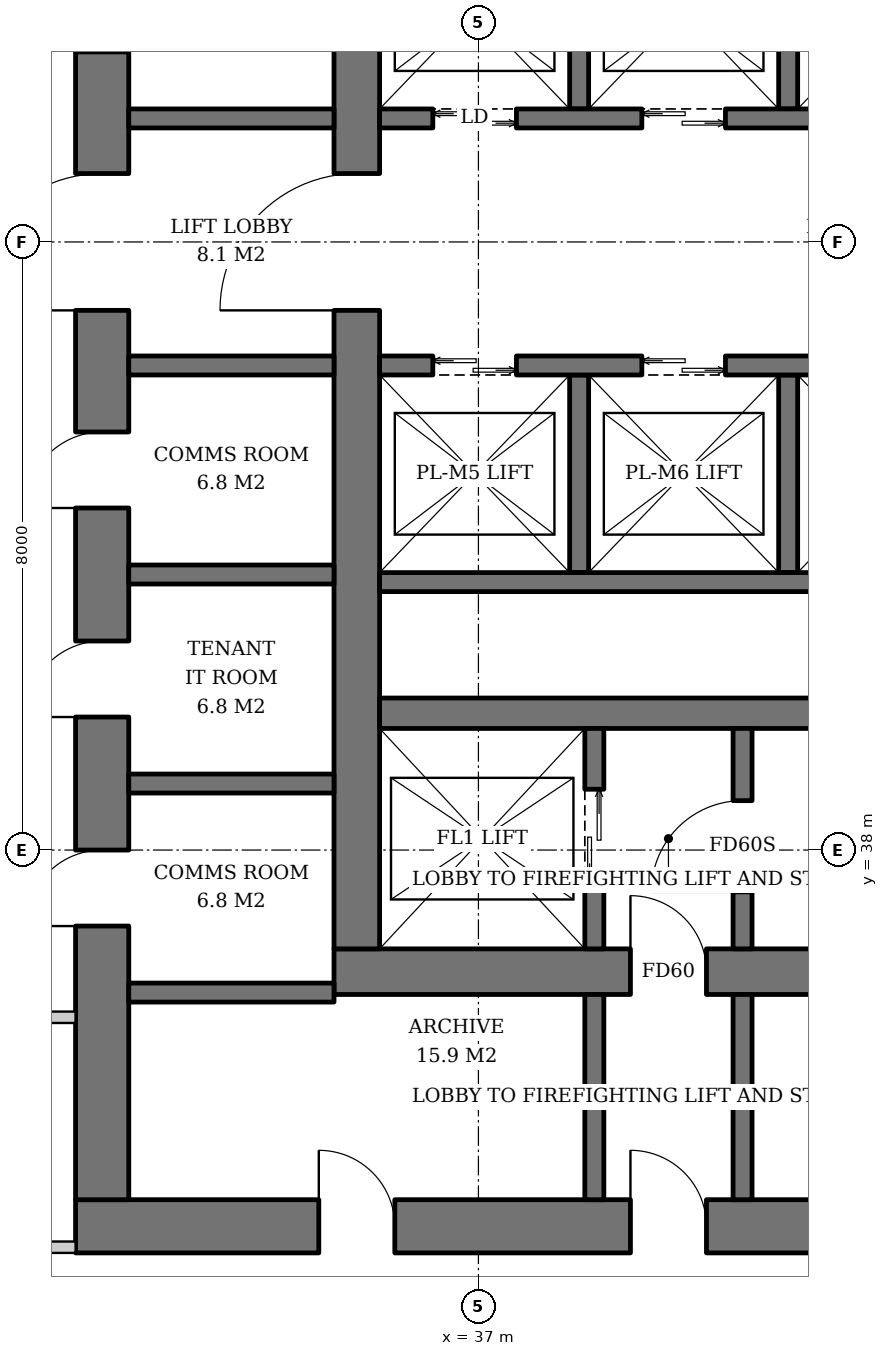
"""IFC4 building model, lengths in metres.
Left out: names, types, materials, properties, quantities, classifications, styles, units other than length and angle.
Written with IfcOpenShell. Run it as: python <this file> out.ifc"""

import sys

from ifc_helpers import new_model, si_unit, direction, frame, frame_2d, origin, place, context, subcontext, project, spatial, rectangle, extrude, element, fill, save


model = new_model("IFC4")
c1 = context("Model", 3, precision=1e-05, world=origin(), true_north=direction((0.0, 1.0)))
c2 = subcontext(c1, "Body", "Model", "MODEL_VIEW")
j1 = project(units=[si_unit("LENGTHUNIT", "METRE"), si_unit("PLANEANGLEUNIT", "RADIAN")], contexts=[c1])
p1 = place(None, origin())
s1 = spatial("IfcSite", under=j1, at=p1, CompositionType="ELEMENT")
p2 = place(p1, origin())
s2 = spatial("IfcBuilding", under=s1, at=p2, CompositionType="ELEMENT")
p3 = place(p2, frame((0.0, 0.0, 116.0)))
s3 = spatial("IfcBuildingStorey", under=s2, at=p3, CompositionType="ELEMENT", Elevation=116.0)
p4 = place(p3, frame((35.1, 36.4, 0.0), z_axis=(0.0, 0.0, 1.0), x_axis=(1.0, 0.0, 0.0)))
e1 = element("IfcWall", 1, at=p4, inside=s3, PredefinedType="SHEAR", context=c2, shape_type="SweptSolid", body=[
    extrude(rectangle(XDim=19.8, YDim=0.6, at=frame_2d((9.9, 0.0))), origin(), (0.0, 0.0, 1.0), 3.8),
])
p5 = place(p4, frame((3.9, 0.0, 0.0)))
e2 = element("IfcOpeningElement", 2, at=p5, cuts=e1, PredefinedType="OPENING", context=c2, shape_type="SweptSolid", body=[
    extrude(rectangle(XDim=1.0, YDim=2.1, at=frame_2d((0.5, 1.05))), frame((0.0, 0.31, 0.0), z_axis=(0.0, -1.0, 0.0), x_axis=(1.0, 0.0, 0.0)), (0.0, 0.0, 1.0), 0.62),
])
p6 = place(p4, frame((15.35, 0.0, 0.0)))
e3 = element("IfcOpeningElement", 3, at=p6, cuts=e1, PredefinedType="OPENING", context=c2, shape_type="SweptSolid", body=[
    extrude(rectangle(XDim=1.0, YDim=2.1, at=frame_2d((0.5, 1.05))), frame((0.0, 0.31, 0.0), z_axis=(0.0, -1.0, 0.0), x_axis=(1.0, 0.0, 0.0)), (0.0, 0.0, 1.0), 0.62),
])
p7 = place(p3, frame((35.4, 36.7, 0.0), z_axis=(0.0, 0.0, 1.0), x_axis=(0.0, 1.0, 0.0)))
e4 = element("IfcWall", 4, at=p7, inside=s3, PredefinedType="SHEAR", context=c2, shape_type="SweptSolid", body=[
    extrude(rectangle(XDim=18.6, YDim=0.6, at=frame_2d((9.3, 0.0))), origin(), (0.0, 0.0, 1.0), 3.8),
])
p8 = place(p7, frame((8.4, 0.0, 0.0)))
e5 = element("IfcOpeningElement", 5, at=p8, cuts=e4, PredefinedType="OPENING", context=c2, shape_type="SweptSolid", body=[
    extrude(rectangle(XDim=1.8, YDim=2.4, at=frame_2d((0.9, 1.2))), frame((0.0, 0.31, 0.0), z_axis=(0.0, -1.0, 0.0), x_axis=(1.0, 0.0, 0.0)), (0.0, 0.0, 1.0), 0.62),
])
p9 = place(p3, frame((31.7, 33.05, 0.0), z_axis=(0.0, 0.0, 1.0), x_axis=(1.0, 0.0, 0.0)))
e6 = element("IfcWall", 6, at=p9, inside=s3, PredefinedType="SHEAR", context=c2, shape_type="SweptSolid", body=[
    extrude(rectangle(XDim=26.6, YDim=0.7, at=frame_2d((13.3, 0.0))), origin(), (0.0, 0.0, 1.0), 3.8),
])
p10 = place(p9, frame((7.3, 0.0, 0.0)))
e7 = element("IfcOpeningElement", 7, at=p10, cuts=e6, PredefinedType="OPENING", context=c2, shape_type="SweptSolid", body=[
    extrude(rectangle(XDim=1.0, YDim=2.1, at=frame_2d((0.5, 1.05))), frame((0.0, 0.36, 0.0), z_axis=(0.0, -1.0, 0.0), x_axis=(1.0, 0.0, 0.0)), (0.0, 0.0, 1.0), 0.72),
])
p11 = place(p9, frame((18.75, 0.0, 0.0)))
e8 = element("IfcOpeningElement", 8, at=p11, cuts=e6, PredefinedType="OPENING", context=c2, shape_type="SweptSolid", body=[
    extrude(rectangle(XDim=1.0, YDim=2.1, at=frame_2d((0.5, 1.05))), frame((0.0, 0.36, 0.0), z_axis=(0.0, -1.0, 0.0), x_axis=(1.0, 0.0, 0.0)), (0.0, 0.0, 1.0), 0.72),
])
p12 = place(p9, frame((3.2, 0.0, 0.0)))
e9 = element("IfcOpeningElement", 9, at=p12, cuts=e6, PredefinedType="OPENING", context=c2, shape_type="SweptSolid", body=[
    extrude(rectangle(XDim=1.0, YDim=2.1, at=frame_2d((0.5, 1.05))), frame((0.0, 0.36, 0.0), z_axis=(0.0, -1.0, 0.0), x_axis=(1.0, 0.0, 0.0)), (0.0, 0.0, 1.0), 0.72),
])
p13 = place(p9, frame((10.42, 0.0, 0.0)))
e10 = element("IfcOpeningElement", 10, at=p13, cuts=e6, PredefinedType="OPENING", context=c2, shape_type="SweptSolid", body=[
    extrude(rectangle(XDim=1.0, YDim=2.1, at=frame_2d((0.5, 1.05))), frame((0.0, 0.36, 0.0), z_axis=(0.0, -1.0, 0.0), x_axis=(1.0, 0.0, 0.0)), (0.0, 0.0, 1.0), 0.72),
])
p14 = place(p9, frame((14.46, 0.0, 0.0)))
e11 = element("IfcOpeningElement", 11, at=p14, cuts=e6, PredefinedType="OPENING", context=c2, shape_type="SweptSolid", body=[
    extrude(rectangle(XDim=1.0, YDim=2.1, at=frame_2d((0.5, 1.05))), frame((0.0, 0.36, 0.0), z_axis=(0.0, -1.0, 0.0), x_axis=(1.0, 0.0, 0.0)), (0.0, 0.0, 1.0), 0.72),
])
p15 = place(p9, frame((22.5, 0.0, 0.0)))
e12 = element("IfcOpeningElement", 12, at=p15, cuts=e6, PredefinedType="OPENING", context=c2, shape_type="SweptSolid", body=[
    extrude(rectangle(XDim=1.0, YDim=2.1, at=frame_2d((0.5, 1.05))), frame((0.0, 0.36, 0.0), z_axis=(0.0, -1.0, 0.0), x_axis=(1.0, 0.0, 0.0)), (0.0, 0.0, 1.0), 0.72),
])
p16 = place(p3, frame((32.05, 33.4, 0.0), z_axis=(0.0, 0.0, 1.0), x_axis=(0.0, 1.0, 0.0)))
e13 = element("IfcWall", 13, at=p16, inside=s3, PredefinedType="SHEAR", context=c2, shape_type="SweptSolid", body=[
    extrude(rectangle(XDim=25.2, YDim=0.7, at=frame_2d((12.6, 0.0))), origin(), (0.0, 0.0, 1.0), 3.8),
])
p17 = place(p16, frame((11.7, 0.0, 0.0)))
e14 = element("IfcOpeningElement", 14, at=p17, cuts=e13, PredefinedType="OPENING", context=c2, shape_type="SweptSolid", body=[
    extrude(rectangle(XDim=1.8, YDim=2.4, at=frame_2d((0.9, 1.2))), frame((0.0, 0.36, 0.0), z_axis=(0.0, -1.0, 0.0), x_axis=(1.0, 0.0, 0.0)), (0.0, 0.0, 1.0), 0.72),
])
p18 = place(p16, frame((3.6, 0.0, 0.0)))
e15 = element("IfcOpeningElement", 15, at=p18, cuts=e13, PredefinedType="OPENING", context=c2, shape_type="SweptSolid", body=[
    extrude(rectangle(XDim=1.0, YDim=2.1, at=frame_2d((0.5, 1.05))), frame((0.0, 0.36, 0.0), z_axis=(0.0, -1.0, 0.0), x_axis=(1.0, 0.0, 0.0)), (0.0, 0.0, 1.0), 0.72),
])
p19 = place(p16, frame((6.35, 0.0, 0.0)))
e16 = element("IfcOpeningElement", 16, at=p19, cuts=e13, PredefinedType="OPENING", context=c2, shape_type="SweptSolid", body=[
    extrude(rectangle(XDim=1.0, YDim=2.1, at=frame_2d((0.5, 1.05))), frame((0.0, 0.36, 0.0), z_axis=(0.0, -1.0, 0.0), x_axis=(1.0, 0.0, 0.0)), (0.0, 0.0, 1.0), 0.72),
])
p20 = place(p16, frame((9.1, 0.0, 0.0)))
e17 = element("IfcOpeningElement", 17, at=p20, cuts=e13, PredefinedType="OPENING", context=c2, shape_type="SweptSolid", body=[
    extrude(rectangle(XDim=1.0, YDim=2.1, at=frame_2d((0.5, 1.05))), frame((0.0, 0.36, 0.0), z_axis=(0.0, -1.0, 0.0), x_axis=(1.0, 0.0, 0.0)), (0.0, 0.0, 1.0), 0.72),
])
p21 = place(p16, frame((15.1, 0.0, 0.0)))
e18 = element("IfcOpeningElement", 18, at=p21, cuts=e13, PredefinedType="OPENING", context=c2, shape_type="SweptSolid", body=[
    extrude(rectangle(XDim=1.0, YDim=2.1, at=frame_2d((0.5, 1.05))), frame((0.0, 0.36, 0.0), z_axis=(0.0, -1.0, 0.0), x_axis=(1.0, 0.0, 0.0)), (0.0, 0.0, 1.0), 0.72),
])
p22 = place(p16, frame((17.85, 0.0, 0.0)))
e19 = element("IfcOpeningElement", 19, at=p22, cuts=e13, PredefinedType="OPENING", context=c2, shape_type="SweptSolid", body=[
    extrude(rectangle(XDim=1.0, YDim=2.1, at=frame_2d((0.5, 1.05))), frame((0.0, 0.36, 0.0), z_axis=(0.0, -1.0, 0.0), x_axis=(1.0, 0.0, 0.0)), (0.0, 0.0, 1.0), 0.72),
])
p23 = place(p3, frame((35.7, 39.8, 0.0), z_axis=(0.0, 0.0, 1.0), x_axis=(1.0, 0.0, 0.0)))
e20 = element("IfcWall", 20, at=p23, inside=s3, PredefinedType="SHEAR", context=c2, shape_type="SweptSolid", body=[
    extrude(rectangle(XDim=18.6, YDim=0.4, at=frame_2d((9.3, 0.0))), origin(), (0.0, 0.0, 1.0), 3.8),
])
p24 = place(p3, frame((38.525, 36.7, 0.0), z_axis=(0.0, 0.0, 1.0), x_axis=(0.0, 1.0, 0.0)))
e21 = element("IfcWall", 21, at=p24, inside=s3, PredefinedType="SHEAR", context=c2, shape_type="SweptSolid", body=[
    extrude(rectangle(XDim=2.9, YDim=0.25, at=frame_2d((1.45, 0.0))), origin(), (0.0, 0.0, 1.0), 3.8),
])
p25 = place(p24, frame((0.8, 0.0, 0.0)))
e22 = element("IfcOpeningElement", 22, at=p25, cuts=e21, PredefinedType="OPENING", context=c2, shape_type="SweptSolid", body=[
    extrude(rectangle(XDim=1.3, YDim=2.2, at=frame_2d((0.65, 1.1))), frame((0.0, 0.135, 0.0), z_axis=(0.0, -1.0, 0.0), x_axis=(1.0, 0.0, 0.0)), (0.0, 0.0, 1.0), 0.27),
])
p26 = place(p3, frame((40.475, 36.7, 0.0), z_axis=(0.0, 0.0, 1.0), x_axis=(0.0, 1.0, 0.0)))
e23 = element("IfcWall", 23, at=p26, inside=s3, PredefinedType="SHEAR", context=c2, shape_type="SweptSolid", body=[
    extrude(rectangle(XDim=2.9, YDim=0.25, at=frame_2d((1.45, 0.0))), origin(), (0.0, 0.0, 1.0), 3.8),
])
p27 = place(p26, frame((0.75, 0.0, 0.0)))
e24 = element("IfcOpeningElement", 24, at=p27, cuts=e23, PredefinedType="OPENING", context=c2, shape_type="SweptSolid", body=[
    extrude(rectangle(XDim=1.2, YDim=2.1, at=frame_2d((0.6, 1.05))), frame((0.0, 0.135, 0.0), z_axis=(0.0, -1.0, 0.0), x_axis=(1.0, 0.0, 0.0)), (0.0, 0.0, 1.0), 0.27),
])
for number, where, z_axis, x_axis in (
    (25, (38.325, 47.75, 0.0), (0.0, 0.0, 1.0), (0.0, 1.0, 0.0)),
    (26, (41.075, 47.75, 0.0), (0.0, 0.0, 1.0), (0.0, 1.0, 0.0)),
):
    element("IfcWall", number, at=place(p3, frame(where, z_axis=z_axis, x_axis=x_axis)), inside=s3, PredefinedType="SHEAR", context=c2, shape_type="SweptSolid", body=[
        extrude(rectangle(XDim=2.6, YDim=0.25, at=frame_2d((1.3, 0.0))), origin(), (0.0, 0.0, 1.0), 3.8),
    ])
p28 = place(p3, frame((35.7, 47.625, 0.0), z_axis=(0.0, 0.0, 1.0), x_axis=(1.0, 0.0, 0.0)))
e27 = element("IfcWall", 27, at=p28, inside=s3, PredefinedType="SHEAR", context=c2, shape_type="SweptSolid", body=[
    extrude(rectangle(XDim=12.83, YDim=0.25, at=frame_2d((6.415, 0.0))), origin(), (0.0, 0.0, 1.0), 3.8),
])
p29 = place(p28, frame((0.7, 0.0, 0.0)))
e28 = element("IfcOpeningElement", 28, at=p29, cuts=e27, PredefinedType="OPENING", context=c2, shape_type="SweptSolid", body=[
    extrude(rectangle(XDim=1.1, YDim=2.2, at=frame_2d((0.55, 1.1))), frame((0.0, 0.135, 0.0), z_axis=(0.0, -1.0, 0.0), x_axis=(1.0, 0.0, 0.0)), (0.0, 0.0, 1.0), 0.27),
])
p30 = place(p28, frame((3.45, 0.0, 0.0)))
e29 = element("IfcOpeningElement", 29, at=p30, cuts=e27, PredefinedType="OPENING", context=c2, shape_type="SweptSolid", body=[
    extrude(rectangle(XDim=1.1, YDim=2.2, at=frame_2d((0.55, 1.1))), frame((0.0, 0.135, 0.0), z_axis=(0.0, -1.0, 0.0), x_axis=(1.0, 0.0, 0.0)), (0.0, 0.0, 1.0), 0.27),
])
p31 = place(p28, frame((6.2, 0.0, 0.0)))
e30 = element("IfcOpeningElement", 30, at=p31, cuts=e27, PredefinedType="OPENING", context=c2, shape_type="SweptSolid", body=[
    extrude(rectangle(XDim=1.1, YDim=2.2, at=frame_2d((0.55, 1.1))), frame((0.0, 0.135, 0.0), z_axis=(0.0, -1.0, 0.0), x_axis=(1.0, 0.0, 0.0)), (0.0, 0.0, 1.0), 0.27),
])
p32 = place(p28, frame((8.95, 0.0, 0.0)))
e31 = element("IfcOpeningElement", 31, at=p32, cuts=e27, PredefinedType="OPENING", context=c2, shape_type="SweptSolid", body=[
    extrude(rectangle(XDim=1.1, YDim=2.2, at=frame_2d((0.55, 1.1))), frame((0.0, 0.135, 0.0), z_axis=(0.0, -1.0, 0.0), x_axis=(1.0, 0.0, 0.0)), (0.0, 0.0, 1.0), 0.27),
])
p33 = place(p28, frame((11.515, 0.0, 0.0)))
e32 = element("IfcOpeningElement", 32, at=p33, cuts=e27, PredefinedType="OPENING", context=c2, shape_type="SweptSolid", body=[
    extrude(rectangle(XDim=0.8, YDim=2.0, at=frame_2d((0.4, 1.0))), frame((0.0, 0.135, 0.0), z_axis=(0.0, -1.0, 0.0), x_axis=(1.0, 0.0, 0.0)), (0.0, 0.0, 1.0), 0.27),
])
for number, where, z_axis, x_axis in (
    (33, (38.325, 44.25, 0.0), (0.0, 0.0, 1.0), (0.0, -1.0, 0.0)),
    (34, (41.075, 44.25, 0.0), (0.0, 0.0, 1.0), (0.0, -1.0, 0.0)),
):
    element("IfcWall", number, at=place(p3, frame(where, z_axis=z_axis, x_axis=x_axis)), inside=s3, PredefinedType="SHEAR", context=c2, shape_type="SweptSolid", body=[
        extrude(rectangle(XDim=2.6, YDim=0.25, at=frame_2d((1.3, 0.0))), origin(), (0.0, 0.0, 1.0), 3.8),
    ])
p34 = place(p3, frame((35.7, 41.525, 0.0), z_axis=(0.0, 0.0, 1.0), x_axis=(1.0, 0.0, 0.0)))
e35 = element("IfcWall", 35, at=p34, inside=s3, PredefinedType="SHEAR", context=c2, shape_type="SweptSolid", body=[
    extrude(rectangle(XDim=11.0, YDim=0.25, at=frame_2d((5.5, 0.0))), origin(), (0.0, 0.0, 1.0), 3.8),
])
p35 = place(p3, frame((35.7, 44.375, 0.0), z_axis=(0.0, 0.0, 1.0), x_axis=(1.0, 0.0, 0.0)))
e36 = element("IfcWall", 36, at=p35, inside=s3, PredefinedType="SHEAR", context=c2, shape_type="SweptSolid", body=[
    extrude(rectangle(XDim=12.83, YDim=0.25, at=frame_2d((6.415, 0.0))), origin(), (0.0, 0.0, 1.0), 3.8),
])
p36 = place(p35, frame((0.7, 0.0, 0.0)))
e37 = element("IfcOpeningElement", 37, at=p36, cuts=e36, PredefinedType="OPENING", context=c2, shape_type="SweptSolid", body=[
    extrude(rectangle(XDim=1.1, YDim=2.2, at=frame_2d((0.55, 1.1))), frame((0.0, 0.135, 0.0), z_axis=(0.0, -1.0, 0.0), x_axis=(1.0, 0.0, 0.0)), (0.0, 0.0, 1.0), 0.27),
])
p37 = place(p35, frame((3.45, 0.0, 0.0)))
e38 = element("IfcOpeningElement", 38, at=p37, cuts=e36, PredefinedType="OPENING", context=c2, shape_type="SweptSolid", body=[
    extrude(rectangle(XDim=1.1, YDim=2.2, at=frame_2d((0.55, 1.1))), frame((0.0, 0.135, 0.0), z_axis=(0.0, -1.0, 0.0), x_axis=(1.0, 0.0, 0.0)), (0.0, 0.0, 1.0), 0.27),
])
p38 = place(p35, frame((6.2, 0.0, 0.0)))
e39 = element("IfcOpeningElement", 39, at=p38, cuts=e36, PredefinedType="OPENING", context=c2, shape_type="SweptSolid", body=[
    extrude(rectangle(XDim=1.1, YDim=2.2, at=frame_2d((0.55, 1.1))), frame((0.0, 0.135, 0.0), z_axis=(0.0, -1.0, 0.0), x_axis=(1.0, 0.0, 0.0)), (0.0, 0.0, 1.0), 0.27),
])
p39 = place(p35, frame((8.95, 0.0, 0.0)))
e40 = element("IfcOpeningElement", 40, at=p39, cuts=e36, PredefinedType="OPENING", context=c2, shape_type="SweptSolid", body=[
    extrude(rectangle(XDim=1.1, YDim=2.2, at=frame_2d((0.55, 1.1))), frame((0.0, 0.135, 0.0), z_axis=(0.0, -1.0, 0.0), x_axis=(1.0, 0.0, 0.0)), (0.0, 0.0, 1.0), 0.27),
])
p40 = place(p35, frame((11.515, 0.0, 0.0)))
e41 = element("IfcOpeningElement", 41, at=p40, cuts=e36, PredefinedType="OPENING", context=c2, shape_type="SweptSolid", body=[
    extrude(rectangle(XDim=0.8, YDim=2.0, at=frame_2d((0.4, 1.0))), frame((0.0, 0.135, 0.0), z_axis=(0.0, -1.0, 0.0), x_axis=(1.0, 0.0, 0.0)), (0.0, 0.0, 1.0), 0.27),
])
for number, where, z_axis, x_axis in (
    (42, (32.4, 36.125, 0.0), (0.0, 0.0, 1.0), (1.0, 0.0, 0.0)),
    (43, (32.4, 38.875, 0.0), (0.0, 0.0, 1.0), (1.0, 0.0, 0.0)),
    (44, (32.4, 41.625, 0.0), (0.0, 0.0, 1.0), (1.0, 0.0, 0.0)),
    (45, (32.4, 44.375, 0.0), (0.0, 0.0, 1.0), (1.0, 0.0, 0.0)),
    (46, (32.4, 47.625, 0.0), (0.0, 0.0, 1.0), (1.0, 0.0, 0.0)),
):
    element("IfcWall", number, at=place(p3, frame(where, z_axis=z_axis, x_axis=x_axis)), inside=s3, PredefinedType="SHEAR", context=c2, shape_type="SweptSolid", body=[
        extrude(rectangle(XDim=2.7, YDim=0.25, at=frame_2d((1.35, 0.0))), origin(), (0.0, 0.0, 1.0), 3.8),
    ])
for number, where, z_axis, x_axis in (
    (47, (38.525, 33.4, 0.0), (0.0, 0.0, 1.0), (0.0, 1.0, 0.0)),
    (48, (40.475, 33.4, 0.0), (0.0, 0.0, 1.0), (0.0, 1.0, 0.0)),
):
    element("IfcWall", number, at=place(p3, frame(where, z_axis=z_axis, x_axis=x_axis)), inside=s3, PredefinedType="SOLIDWALL", context=c2, shape_type="SweptSolid", body=[
        extrude(rectangle(XDim=2.7, YDim=0.25, at=frame_2d((1.35, 0.0))), origin(), (0.0, 0.0, 1.0), 3.62),
    ])
for number, where, z_axis, x_axis in (
    (49, (31.7, 35.8, 0.0), (0.0, 0.0, 1.0), (-1.0, 0.0, 0.0)),
    (50, (31.7, 32.775, 0.0), (0.0, 0.0, 1.0), (-1.0, 0.0, 0.0)),
):
    element("IfcWall", number, at=place(p3, frame(where, z_axis=z_axis, x_axis=x_axis)), inside=s3, PredefinedType="PARTITIONING", context=c2, shape_type="SweptSolid", body=[
        extrude(rectangle(XDim=2.325, YDim=0.15, at=frame_2d((1.163, 0.0))), origin(), (0.0, 0.0, 1.0), 3.62),
    ])
p41 = place(p25, origin())
e51 = element("IfcDoor", 51, at=p41, inside=s3, OperationType="DOUBLE_DOOR_SLIDING", PredefinedType="DOOR", context=c2, shape_type="SweptSolid", body=[
    extrude(rectangle(XDim=1.3, YDim=2.2, at=frame_2d((0.65, 1.1))), frame((0.0, 0.025, 0.0), z_axis=(0.0, -1.0, 0.0), x_axis=(1.0, 0.0, 0.0)), (0.0, 0.0, 1.0), 0.05),
])
fill(e22, e51)
p42 = place(p27, origin())
e52 = element("IfcDoor", 52, at=p42, inside=s3, OperationType="SINGLE_SWING_LEFT", PredefinedType="DOOR", context=c2, shape_type="SweptSolid", body=[
    extrude(rectangle(XDim=1.2, YDim=2.1, at=frame_2d((0.6, 1.05))), frame((0.0, 0.025, 0.0), z_axis=(0.0, -1.0, 0.0), x_axis=(1.0, 0.0, 0.0)), (0.0, 0.0, 1.0), 0.05),
])
fill(e24, e52)
p43 = place(p29, origin())
e53 = element("IfcDoor", 53, at=p43, inside=s3, OperationType="DOUBLE_DOOR_SLIDING", PredefinedType="DOOR", context=c2, shape_type="SweptSolid", body=[
    extrude(rectangle(XDim=1.1, YDim=2.2, at=frame_2d((0.55, 1.1))), frame((0.0, 0.025, 0.0), z_axis=(0.0, -1.0, 0.0), x_axis=(1.0, 0.0, 0.0)), (0.0, 0.0, 1.0), 0.05),
])
fill(e28, e53)
p44 = place(p30, origin())
e54 = element("IfcDoor", 54, at=p44, inside=s3, OperationType="DOUBLE_DOOR_SLIDING", PredefinedType="DOOR", context=c2, shape_type="SweptSolid", body=[
    extrude(rectangle(XDim=1.1, YDim=2.2, at=frame_2d((0.55, 1.1))), frame((0.0, 0.025, 0.0), z_axis=(0.0, -1.0, 0.0), x_axis=(1.0, 0.0, 0.0)), (0.0, 0.0, 1.0), 0.05),
])
fill(e29, e54)
p45 = place(p36, origin())
e55 = element("IfcDoor", 55, at=p45, inside=s3, OperationType="DOUBLE_DOOR_SLIDING", PredefinedType="DOOR", context=c2, shape_type="SweptSolid", body=[
    extrude(rectangle(XDim=1.1, YDim=2.2, at=frame_2d((0.55, 1.1))), frame((0.0, 0.025, 0.0), z_axis=(0.0, -1.0, 0.0), x_axis=(1.0, 0.0, 0.0)), (0.0, 0.0, 1.0), 0.05),
])
fill(e37, e55)
p46 = place(p37, origin())
e56 = element("IfcDoor", 56, at=p46, inside=s3, OperationType="DOUBLE_DOOR_SLIDING", PredefinedType="DOOR", context=c2, shape_type="SweptSolid", body=[
    extrude(rectangle(XDim=1.1, YDim=2.2, at=frame_2d((0.55, 1.1))), frame((0.0, 0.025, 0.0), z_axis=(0.0, -1.0, 0.0), x_axis=(1.0, 0.0, 0.0)), (0.0, 0.0, 1.0), 0.05),
])
fill(e38, e56)
p47 = place(p5, origin())
e57 = element("IfcDoor", 57, at=p47, inside=s3, OperationType="SINGLE_SWING_LEFT", PredefinedType="DOOR", context=c2, shape_type="SweptSolid", body=[
    extrude(rectangle(XDim=1.0, YDim=2.1, at=frame_2d((0.5, 1.05))), frame((0.0, 0.025, 0.0), z_axis=(0.0, -1.0, 0.0), x_axis=(1.0, 0.0, 0.0)), (0.0, 0.0, 1.0), 0.05),
])
fill(e2, e57)
p48 = place(p8, origin())
e58 = element("IfcDoor", 58, at=p48, inside=s3, OperationType="DOUBLE_DOOR_SINGLE_SWING", PredefinedType="DOOR", context=c2, shape_type="SweptSolid", body=[
    extrude(rectangle(XDim=1.8, YDim=2.4, at=frame_2d((0.9, 1.2))), frame((0.0, 0.025, 0.0), z_axis=(0.0, -1.0, 0.0), x_axis=(1.0, 0.0, 0.0)), (0.0, 0.0, 1.0), 0.05),
])
fill(e5, e58)
p49 = place(p17, origin())
e59 = element("IfcDoor", 59, at=p49, inside=s3, OperationType="DOUBLE_DOOR_SINGLE_SWING", PredefinedType="DOOR", context=c2, shape_type="SweptSolid", body=[
    extrude(rectangle(XDim=1.8, YDim=2.4, at=frame_2d((0.9, 1.2))), frame((0.0, 0.025, 0.0), z_axis=(0.0, -1.0, 0.0), x_axis=(1.0, 0.0, 0.0)), (0.0, 0.0, 1.0), 0.05),
])
fill(e14, e59)
p50 = place(p10, origin())
e60 = element("IfcDoor", 60, at=p50, inside=s3, OperationType="SINGLE_SWING_LEFT", PredefinedType="DOOR", context=c2, shape_type="SweptSolid", body=[
    extrude(rectangle(XDim=1.0, YDim=2.1, at=frame_2d((0.5, 1.05))), frame((0.0, 0.025, 0.0), z_axis=(0.0, -1.0, 0.0), x_axis=(1.0, 0.0, 0.0)), (0.0, 0.0, 1.0), 0.05),
])
fill(e7, e60)
p51 = place(p18, origin())
e61 = element("IfcDoor", 61, at=p51, inside=s3, OperationType="SINGLE_SWING_LEFT", PredefinedType="DOOR", context=c2, shape_type="SweptSolid", body=[
    extrude(rectangle(XDim=1.0, YDim=2.1, at=frame_2d((0.5, 1.05))), frame((0.0, -0.29, 0.0), z_axis=(0.0, -1.0, 0.0), x_axis=(1.0, 0.0, 0.0)), (0.0, 0.0, 1.0), 0.05),
])
fill(e15, e61)
p52 = place(p19, origin())
e62 = element("IfcDoor", 62, at=p52, inside=s3, OperationType="SINGLE_SWING_LEFT", PredefinedType="DOOR", context=c2, shape_type="SweptSolid", body=[
    extrude(rectangle(XDim=1.0, YDim=2.1, at=frame_2d((0.5, 1.05))), frame((0.0, -0.29, 0.0), z_axis=(0.0, -1.0, 0.0), x_axis=(1.0, 0.0, 0.0)), (0.0, 0.0, 1.0), 0.05),
])
fill(e16, e62)
p53 = place(p20, origin())
e63 = element("IfcDoor", 63, at=p53, inside=s3, OperationType="SINGLE_SWING_LEFT", PredefinedType="DOOR", context=c2, shape_type="SweptSolid", body=[
    extrude(rectangle(XDim=1.0, YDim=2.1, at=frame_2d((0.5, 1.05))), frame((0.0, -0.29, 0.0), z_axis=(0.0, -1.0, 0.0), x_axis=(1.0, 0.0, 0.0)), (0.0, 0.0, 1.0), 0.05),
])
fill(e17, e63)
p54 = place(p12, origin())
e64 = element("IfcDoor", 64, at=p54, inside=s3, OperationType="SINGLE_SWING_LEFT", PredefinedType="DOOR", context=c2, shape_type="SweptSolid", body=[
    extrude(rectangle(XDim=1.0, YDim=2.1, at=frame_2d((0.5, 1.05))), frame((0.0, 0.34, 0.0), z_axis=(0.0, -1.0, 0.0), x_axis=(1.0, 0.0, 0.0)), (0.0, 0.0, 1.0), 0.05),
])
fill(e9, e64)
save(model, sys.argv[1])
